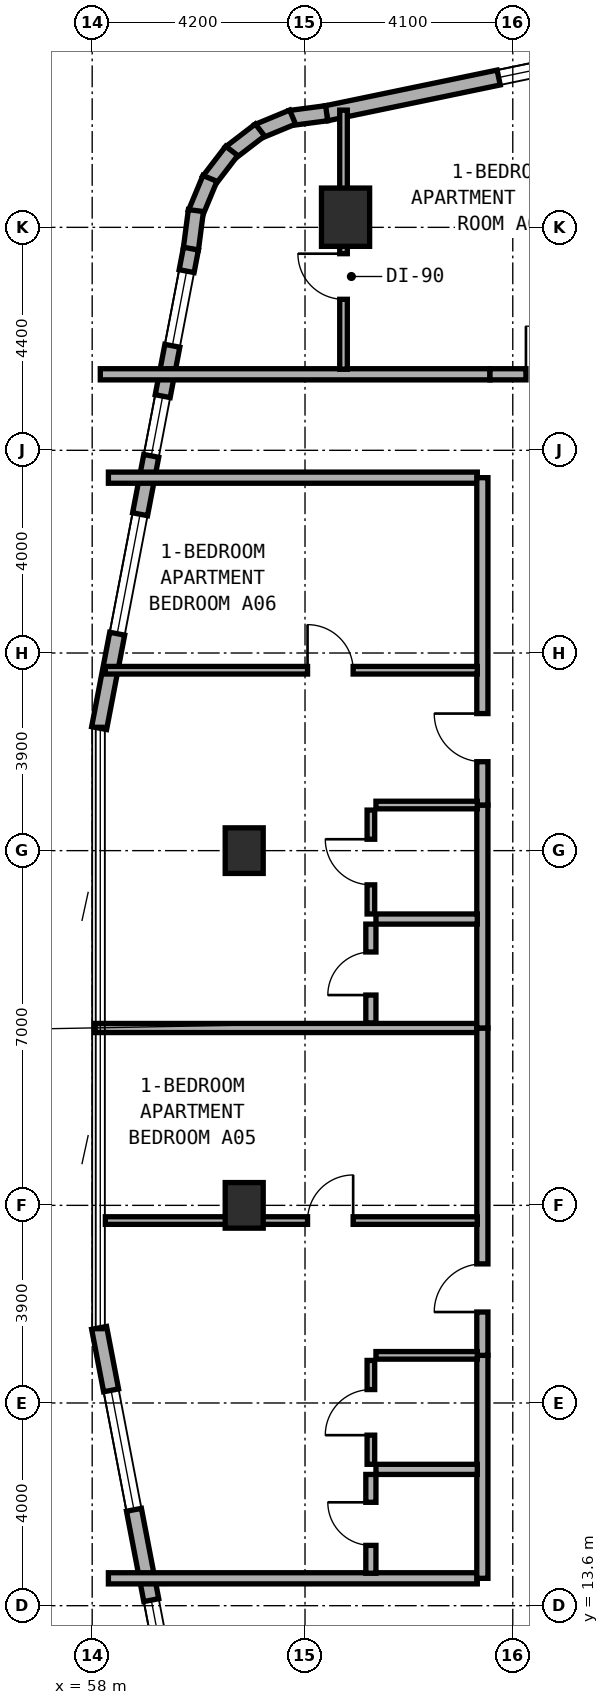
"""IFC4 building model, lengths in metres.
Left out: names, types, materials, properties, quantities, classifications, styles, units other than length and angle.
Written with IfcOpenShell. Run it as: python <this file> out.ifc"""

import sys

from ifc_helpers import new_model, si_unit, direction, frame, frame_2d, origin, origin_2d, place, context, subcontext, project, spatial, rectangle, extrude, element, fill, save


model = new_model("IFC4")
c1 = context("Model", 3, precision=1e-05, world=origin(), true_north=direction((0.0, 1.0)))
c2 = subcontext(c1, "Body", "Model", "MODEL_VIEW")
j1 = project(units=[si_unit("LENGTHUNIT", "METRE"), si_unit("PLANEANGLEUNIT", "RADIAN")], contexts=[c1])
p1 = place(None, origin())
s1 = spatial("IfcSite", under=j1, at=p1, CompositionType="ELEMENT")
p2 = place(p1, origin())
s2 = spatial("IfcBuilding", under=s1, at=p2, CompositionType="ELEMENT")
p3 = place(p2, frame((0.0, 0.0, 62.5)))
s3 = spatial("IfcBuildingStorey", under=s2, at=p3, CompositionType="ELEMENT", Elevation=62.5)
for number, where, z_axis, x_axis in (
    (1, (61.0, 21.5, 0.0), (0.0, 0.0, 1.0), (1.0, 0.0, 0.0)),
    (2, (61.0, 28.5, 0.0), (0.0, 0.0, 1.0), (1.0, 0.0, 0.0)),
):
    element("IfcColumn", number, at=place(p3, frame(where, z_axis=z_axis, x_axis=x_axis)), inside=s3, PredefinedType="COLUMN", context=c2, shape_type="SweptSolid", body=[
        extrude(rectangle(XDim=0.75, YDim=0.9, at=origin_2d()), origin(), (0.0, 0.0, 1.0), 3.5),
    ])
p4 = place(p3, frame((63.0, 41.0, 0.0), z_axis=(0.0, 0.0, 1.0), x_axis=(1.0, 0.0, 0.0)))
e3 = element("IfcColumn", 3, at=p4, inside=s3, PredefinedType="COLUMN", context=c2, shape_type="SweptSolid", body=[
    extrude(rectangle(XDim=0.95, YDim=1.15, at=origin_2d()), origin(), (0.0, 0.0, 1.0), 3.5),
])
p5 = place(p3, frame((71.356, 44.864, 0.0), z_axis=(0.0, 0.0, 1.0), x_axis=(-0.979127260729, -0.203248142175, 0.0)))
e4 = element("IfcWall", 4, at=p5, inside=s3, PredefinedType="STANDARD", context=c2, shape_type="SweptSolid", body=[
    extrude(rectangle(XDim=8.92, YDim=0.3, at=frame_2d((4.46, 0.0))), origin(), (0.0, 0.0, 1.0), 3.25),
])
p6 = place(p5, frame((3.048, 0.0, 0.8)))
e5 = element("IfcOpeningElement", 5, at=p6, cuts=e4, PredefinedType="OPENING", context=c2, shape_type="SweptSolid", body=[
    extrude(rectangle(XDim=2.4, YDim=1.6, at=frame_2d((1.2, 0.8))), frame((0.0, 0.16, 0.0), z_axis=(0.0, -1.0, 0.0), x_axis=(1.0, 0.0, 0.0)), (0.0, 0.0, 1.0), 0.32),
])
p7 = place(p3, frame((62.627, 43.052, 0.0), z_axis=(0.0, 0.0, 1.0), x_axis=(-0.991480488834, -0.130255288807, 0.0)))
e6 = element("IfcWall", 6, at=p7, inside=s3, PredefinedType="STANDARD", context=c2, shape_type="SweptSolid", body=[
    extrude(rectangle(XDim=0.729, YDim=0.3, at=frame_2d((0.365, 0.0))), origin(), (0.0, 0.0, 1.0), 3.25),
])
for number, where, z_axis, x_axis in (
    (7, (61.955, 42.976, 0.0), (0.0, 0.0, 1.0), (-0.924, -0.384, 0.0)),
    (8, (61.311, 42.721, 0.0), (0.0, 0.0, 1.0), (-0.794, -0.608, 0.0)),
    (9, (60.754, 42.309, 0.0), (0.0, 0.0, 1.0), (-0.608, -0.794, 0.0)),
    (10, (60.324, 41.766, 0.0), (0.0, 0.0, 1.0), (-0.383, -0.924, 0.0)),
):
    element("IfcWall", number, at=place(p3, frame(where, z_axis=z_axis, x_axis=x_axis)), inside=s3, PredefinedType="STANDARD", context=c2, shape_type="SweptSolid", body=[
        extrude(rectangle(XDim=0.746, YDim=0.3, at=frame_2d((0.373, 0.0))), origin(), (0.0, 0.0, 1.0), 3.25),
    ])
p8 = place(p3, frame((60.047, 41.131, 0.0), z_axis=(0.0, 0.0, 1.0), x_axis=(-0.129653178221, -0.991559404866, 0.0)))
e11 = element("IfcWall", 11, at=p8, inside=s3, PredefinedType="STANDARD", context=c2, shape_type="SweptSolid", body=[
    extrude(rectangle(XDim=0.764, YDim=0.3, at=frame_2d((0.382, 0.0))), origin(), (0.0, 0.0, 1.0), 3.25),
])
p9 = place(p3, frame((59.949, 40.38, 0.0), z_axis=(0.0, 0.0, 1.0), x_axis=(-0.188087874316, -0.982152203854, 0.0)))
e12 = element("IfcWall", 12, at=p9, inside=s3, PredefinedType="STANDARD", context=c2, shape_type="SweptSolid", body=[
    extrude(rectangle(XDim=9.634, YDim=0.3, at=frame_2d((4.817, 0.0))), origin(), (0.0, 0.0, 1.0), 3.25),
])
p10 = place(p9, frame((0.452, 0.0, 0.85)))
e13 = element("IfcOpeningElement", 13, at=p10, cuts=e12, PredefinedType="OPENING", context=c2, shape_type="SweptSolid", body=[
    extrude(rectangle(XDim=1.5, YDim=1.5, at=frame_2d((0.75, 0.75))), frame((0.0, 0.16, 0.0), z_axis=(0.0, -1.0, 0.0), x_axis=(1.0, 0.0, 0.0)), (0.0, 0.0, 1.0), 0.32),
])
p11 = place(p9, frame((2.964, 0.0, 0.85)))
e14 = element("IfcOpeningElement", 14, at=p11, cuts=e12, PredefinedType="OPENING", context=c2, shape_type="SweptSolid", body=[
    extrude(rectangle(XDim=1.2, YDim=1.5, at=frame_2d((0.6, 0.75))), frame((0.0, 0.16, 0.0), z_axis=(0.0, -1.0, 0.0), x_axis=(1.0, 0.0, 0.0)), (0.0, 0.0, 1.0), 0.32),
])
p12 = place(p9, frame((5.337, 0.0, 0.8)))
e15 = element("IfcOpeningElement", 15, at=p12, cuts=e12, PredefinedType="OPENING", context=c2, shape_type="SweptSolid", body=[
    extrude(rectangle(XDim=2.4, YDim=1.6, at=frame_2d((1.2, 0.8))), frame((0.0, 0.16, 0.0), z_axis=(0.0, -1.0, 0.0), x_axis=(1.0, 0.0, 0.0)), (0.0, 0.0, 1.0), 0.32),
])
p13 = place(p3, frame((58.137, 19.082, 0.0), z_axis=(0.0, 0.0, 1.0), x_axis=(0.188087874316, -0.982152203854, 0.0)))
e16 = element("IfcWall", 16, at=p13, inside=s3, PredefinedType="STANDARD", context=c2, shape_type="SweptSolid", body=[
    extrude(rectangle(XDim=9.634, YDim=0.3, at=frame_2d((4.817, 0.0))), origin(), (0.0, 0.0, 1.0), 3.25),
])
p14 = place(p13, frame((1.255, 0.0, 0.8)))
e17 = element("IfcOpeningElement", 17, at=p14, cuts=e16, PredefinedType="OPENING", context=c2, shape_type="SweptSolid", body=[
    extrude(rectangle(XDim=2.4, YDim=1.6, at=frame_2d((1.2, 0.8))), frame((0.0, 0.16, 0.0), z_axis=(0.0, -1.0, 0.0), x_axis=(1.0, 0.0, 0.0)), (0.0, 0.0, 1.0), 0.32),
])
p15 = place(p13, frame((5.47, 0.0, 0.85)))
e18 = element("IfcOpeningElement", 18, at=p15, cuts=e16, PredefinedType="OPENING", context=c2, shape_type="SweptSolid", body=[
    extrude(rectangle(XDim=1.2, YDim=1.5, at=frame_2d((0.6, 0.75))), frame((0.0, 0.16, 0.0), z_axis=(0.0, -1.0, 0.0), x_axis=(1.0, 0.0, 0.0)), (0.0, 0.0, 1.0), 0.32),
])
p16 = place(p13, frame((7.682, 0.0, 0.85)))
e19 = element("IfcOpeningElement", 19, at=p16, cuts=e16, PredefinedType="OPENING", context=c2, shape_type="SweptSolid", body=[
    extrude(rectangle(XDim=1.5, YDim=1.5, at=frame_2d((0.75, 0.75))), frame((0.0, 0.16, 0.0), z_axis=(0.0, -1.0, 0.0), x_axis=(1.0, 0.0, 0.0)), (0.0, 0.0, 1.0), 0.32),
])
p17 = place(p3, frame((58.16, 37.9, 0.0), z_axis=(0.0, 0.0, 1.0), x_axis=(1.0, 0.0, 0.0)))
e20 = element("IfcWall", 20, at=p17, inside=s3, PredefinedType="SOLIDWALL", context=c2, shape_type="SweptSolid", body=[
    extrude(rectangle(XDim=7.69, YDim=0.22, at=frame_2d((3.845, 0.0))), origin(), (0.0, 0.0, 1.0), 2.865),
])
p18 = place(p3, frame((65.85, 37.9, 0.0), z_axis=(0.0, 0.0, 1.0), x_axis=(1.0, 0.0, 0.0)))
e21 = element("IfcWall", 21, at=p18, inside=s3, PredefinedType="SOLIDWALL", context=c2, shape_type="SweptSolid", body=[
    extrude(rectangle(XDim=2.37, YDim=0.22, at=frame_2d((1.185, 0.0))), origin(), (0.0, 0.0, 1.0), 3.22),
])
p19 = place(p18, frame((0.71, 0.0, 0.0)))
e22 = element("IfcOpeningElement", 22, at=p19, cuts=e21, PredefinedType="OPENING", context=c2, shape_type="SweptSolid", body=[
    extrude(rectangle(XDim=0.95, YDim=2.1, at=frame_2d((0.475, 1.05))), frame((0.0, 0.12, 0.0), z_axis=(0.0, -1.0, 0.0), x_axis=(1.0, 0.0, 0.0)), (0.0, 0.0, 1.0), 0.24),
])
p20 = place(p3, frame((62.96, 38.0, 0.0), z_axis=(0.0, 0.0, 1.0), x_axis=(0.0, 1.0, 0.0)))
e23 = element("IfcWall", 23, at=p20, inside=s3, PredefinedType="PARTITIONING", context=c2, shape_type="SweptSolid", body=[
    extrude(rectangle(XDim=5.113, YDim=0.15, at=frame_2d((2.557, 0.0))), origin(), (0.0, 0.0, 1.0), 2.865),
])
p21 = place(p20, frame((1.38, 0.0, 0.0)))
e24 = element("IfcOpeningElement", 24, at=p21, cuts=e23, PredefinedType="OPENING", context=c2, shape_type="SweptSolid", body=[
    extrude(rectangle(XDim=0.9, YDim=2.1, at=frame_2d((0.45, 1.05))), frame((0.0, 0.085, 0.0), z_axis=(0.0, -1.0, 0.0), x_axis=(1.0, 0.0, 0.0)), (0.0, 0.0, 1.0), 0.17),
])
for number, where, z_axis, x_axis in (
    (25, (58.32, 14.14, 0.0), (0.0, 0.0, 1.0), (1.0, 0.0, 0.0)),
    (26, (58.32, 35.86, 0.0), (0.0, 0.0, 1.0), (1.0, 0.0, 0.0)),
):
    element("IfcWall", number, at=place(p3, frame(where, z_axis=z_axis, x_axis=x_axis)), inside=s3, PredefinedType="SOLIDWALL", context=c2, shape_type="SweptSolid", body=[
        extrude(rectangle(XDim=7.28, YDim=0.22, at=frame_2d((3.64, 0.0))), origin(), (0.0, 0.0, 1.0), 2.865),
    ])
p22 = place(p3, frame((58.06, 25.0, 0.0), z_axis=(0.0, 0.0, 1.0), x_axis=(1.0, 0.0, 0.0)))
e27 = element("IfcWall", 27, at=p22, inside=s3, PredefinedType="SOLIDWALL", context=c2, shape_type="SweptSolid", body=[
    extrude(rectangle(XDim=7.64, YDim=0.18, at=frame_2d((3.82, 0.0))), origin(), (0.0, 0.0, 1.0), 2.865),
])
p23 = place(p3, frame((65.7, 14.14, 0.0), z_axis=(0.0, 0.0, 1.0), x_axis=(0.0, 1.0, 0.0)))
e28 = element("IfcWall", 28, at=p23, inside=s3, PredefinedType="SOLIDWALL", context=c2, shape_type="SweptSolid", body=[
    extrude(rectangle(XDim=4.4, YDim=0.22, at=frame_2d((2.2, 0.0))), origin(), (0.0, 0.0, 1.0), 3.22),
])
p24 = place(p3, frame((65.7, 18.54, 0.0), z_axis=(0.0, 0.0, 1.0), x_axis=(0.0, 1.0, 0.0)))
e29 = element("IfcWall", 29, at=p24, inside=s3, PredefinedType="SOLIDWALL", context=c2, shape_type="SweptSolid", body=[
    extrude(rectangle(XDim=6.46, YDim=0.22, at=frame_2d((3.23, 0.0))), origin(), (0.0, 0.0, 1.0), 2.725),
])
p25 = place(p24, frame((0.855, 0.0, 0.0)))
e30 = element("IfcOpeningElement", 30, at=p25, cuts=e29, PredefinedType="OPENING", context=c2, shape_type="SweptSolid", body=[
    extrude(rectangle(XDim=0.95, YDim=2.1, at=frame_2d((0.475, 1.05))), frame((0.0, 0.12, 0.0), z_axis=(0.0, -1.0, 0.0), x_axis=(1.0, 0.0, 0.0)), (0.0, 0.0, 1.0), 0.24),
])
p26 = place(p3, frame((58.26, 21.2, 0.0), z_axis=(0.0, 0.0, 1.0), x_axis=(1.0, 0.0, 0.0)))
e31 = element("IfcWall", 31, at=p26, inside=s3, PredefinedType="PARTITIONING", context=c2, shape_type="SweptSolid", body=[
    extrude(rectangle(XDim=7.34, YDim=0.15, at=frame_2d((3.67, 0.0))), origin(), (0.0, 0.0, 1.0), 2.865),
])
p27 = place(p26, frame((3.99, 0.0, 0.0)))
e32 = element("IfcOpeningElement", 32, at=p27, cuts=e31, PredefinedType="OPENING", context=c2, shape_type="SweptSolid", body=[
    extrude(rectangle(XDim=0.9, YDim=2.1, at=frame_2d((0.45, 1.05))), frame((0.0, 0.085, 0.0), z_axis=(0.0, -1.0, 0.0), x_axis=(1.0, 0.0, 0.0)), (0.0, 0.0, 1.0), 0.17),
])
p28 = place(p3, frame((63.6, 16.29, 0.0), z_axis=(0.0, 0.0, 1.0), x_axis=(1.0, 0.0, 0.0)))
e33 = element("IfcWall", 33, at=p28, inside=s3, PredefinedType="PLUMBINGWALL", context=c2, shape_type="SweptSolid", body=[
    extrude(rectangle(XDim=2.0, YDim=0.2, at=frame_2d((1.0, 0.0))), origin(), (0.0, 0.0, 1.0), 3.22),
])
p29 = place(p3, frame((63.6, 18.54, 0.0), z_axis=(0.0, 0.0, 1.0), x_axis=(1.0, 0.0, 0.0)))
e34 = element("IfcWall", 34, at=p29, inside=s3, PredefinedType="PARTITIONING", context=c2, shape_type="SweptSolid", body=[
    extrude(rectangle(XDim=2.0, YDim=0.15, at=frame_2d((1.0, 0.0))), origin(), (0.0, 0.0, 1.0), 3.22),
])
p30 = place(p3, frame((63.5, 14.24, 0.0), z_axis=(0.0, 0.0, 1.0), x_axis=(0.0, 1.0, 0.0)))
e35 = element("IfcWall", 35, at=p30, inside=s3, PredefinedType="PLUMBINGWALL", context=c2, shape_type="SweptSolid", body=[
    extrude(rectangle(XDim=1.95, YDim=0.2, at=frame_2d((0.975, 0.0))), origin(), (0.0, 0.0, 1.0), 3.22),
])
p31 = place(p30, frame((0.55, 0.0, 0.0)))
e36 = element("IfcOpeningElement", 36, at=p31, cuts=e35, PredefinedType="OPENING", context=c2, shape_type="SweptSolid", body=[
    extrude(rectangle(XDim=0.85, YDim=2.1, at=frame_2d((0.425, 1.05))), frame((0.0, 0.11, 0.0), z_axis=(0.0, -1.0, 0.0), x_axis=(1.0, 0.0, 0.0)), (0.0, 0.0, 1.0), 0.22),
])
p32 = place(p3, frame((63.5, 16.39, 0.0), z_axis=(0.0, 0.0, 1.0), x_axis=(0.0, 1.0, 0.0)))
e37 = element("IfcWall", 37, at=p32, inside=s3, PredefinedType="PARTITIONING", context=c2, shape_type="SweptSolid", body=[
    extrude(rectangle(XDim=2.05, YDim=0.15, at=frame_2d((1.025, 0.0))), origin(), (0.0, 0.0, 1.0), 3.22),
])
p33 = place(p32, frame((0.575, 0.0, 0.0)))
e38 = element("IfcOpeningElement", 38, at=p33, cuts=e37, PredefinedType="OPENING", context=c2, shape_type="SweptSolid", body=[
    extrude(rectangle(XDim=0.9, YDim=2.1, at=frame_2d((0.45, 1.05))), frame((0.0, 0.085, 0.0), z_axis=(0.0, -1.0, 0.0), x_axis=(1.0, 0.0, 0.0)), (0.0, 0.0, 1.0), 0.17),
])
p34 = place(p3, frame((65.7, 25.0, 0.0), z_axis=(0.0, 0.0, 1.0), x_axis=(0.0, 1.0, 0.0)))
e39 = element("IfcWall", 39, at=p34, inside=s3, PredefinedType="SOLIDWALL", context=c2, shape_type="SweptSolid", body=[
    extrude(rectangle(XDim=4.4, YDim=0.22, at=frame_2d((2.2, 0.0))), origin(), (0.0, 0.0, 1.0), 2.725),
])
p35 = place(p3, frame((65.7, 29.4, 0.0), z_axis=(0.0, 0.0, 1.0), x_axis=(0.0, 1.0, 0.0)))
e40 = element("IfcWall", 40, at=p35, inside=s3, PredefinedType="SOLIDWALL", context=c2, shape_type="SweptSolid", body=[
    extrude(rectangle(XDim=6.46, YDim=0.22, at=frame_2d((3.23, 0.0))), origin(), (0.0, 0.0, 1.0), 3.22),
])
p36 = place(p35, frame((0.855, 0.0, 0.0)))
e41 = element("IfcOpeningElement", 41, at=p36, cuts=e40, PredefinedType="OPENING", context=c2, shape_type="SweptSolid", body=[
    extrude(rectangle(XDim=0.95, YDim=2.1, at=frame_2d((0.475, 1.05))), frame((0.0, 0.12, 0.0), z_axis=(0.0, -1.0, 0.0), x_axis=(1.0, 0.0, 0.0)), (0.0, 0.0, 1.0), 0.24),
])
p37 = place(p3, frame((58.26, 32.06, 0.0), z_axis=(0.0, 0.0, 1.0), x_axis=(1.0, 0.0, 0.0)))
e42 = element("IfcWall", 42, at=p37, inside=s3, PredefinedType="PARTITIONING", context=c2, shape_type="SweptSolid", body=[
    extrude(rectangle(XDim=7.34, YDim=0.15, at=frame_2d((3.67, 0.0))), origin(), (0.0, 0.0, 1.0), 2.865),
])
p38 = place(p37, frame((3.99, 0.0, 0.0)))
e43 = element("IfcOpeningElement", 43, at=p38, cuts=e42, PredefinedType="OPENING", context=c2, shape_type="SweptSolid", body=[
    extrude(rectangle(XDim=0.9, YDim=2.1, at=frame_2d((0.45, 1.05))), frame((0.0, 0.085, 0.0), z_axis=(0.0, -1.0, 0.0), x_axis=(1.0, 0.0, 0.0)), (0.0, 0.0, 1.0), 0.17),
])
p39 = place(p3, frame((63.6, 27.15, 0.0), z_axis=(0.0, 0.0, 1.0), x_axis=(1.0, 0.0, 0.0)))
e44 = element("IfcWall", 44, at=p39, inside=s3, PredefinedType="PLUMBINGWALL", context=c2, shape_type="SweptSolid", body=[
    extrude(rectangle(XDim=2.0, YDim=0.2, at=frame_2d((1.0, 0.0))), origin(), (0.0, 0.0, 1.0), 3.22),
])
p40 = place(p3, frame((63.6, 29.4, 0.0), z_axis=(0.0, 0.0, 1.0), x_axis=(1.0, 0.0, 0.0)))
e45 = element("IfcWall", 45, at=p40, inside=s3, PredefinedType="PARTITIONING", context=c2, shape_type="SweptSolid", body=[
    extrude(rectangle(XDim=2.0, YDim=0.15, at=frame_2d((1.0, 0.0))), origin(), (0.0, 0.0, 1.0), 3.22),
])
p41 = place(p3, frame((63.5, 25.1, 0.0), z_axis=(0.0, 0.0, 1.0), x_axis=(0.0, 1.0, 0.0)))
e46 = element("IfcWall", 46, at=p41, inside=s3, PredefinedType="PLUMBINGWALL", context=c2, shape_type="SweptSolid", body=[
    extrude(rectangle(XDim=1.95, YDim=0.2, at=frame_2d((0.975, 0.0))), origin(), (0.0, 0.0, 1.0), 3.22),
])
p42 = place(p41, frame((0.55, 0.0, 0.0)))
e47 = element("IfcOpeningElement", 47, at=p42, cuts=e46, PredefinedType="OPENING", context=c2, shape_type="SweptSolid", body=[
    extrude(rectangle(XDim=0.85, YDim=2.1, at=frame_2d((0.425, 1.05))), frame((0.0, 0.11, 0.0), z_axis=(0.0, -1.0, 0.0), x_axis=(1.0, 0.0, 0.0)), (0.0, 0.0, 1.0), 0.22),
])
p43 = place(p3, frame((63.5, 27.25, 0.0), z_axis=(0.0, 0.0, 1.0), x_axis=(0.0, 1.0, 0.0)))
e48 = element("IfcWall", 48, at=p43, inside=s3, PredefinedType="PARTITIONING", context=c2, shape_type="SweptSolid", body=[
    extrude(rectangle(XDim=2.05, YDim=0.15, at=frame_2d((1.025, 0.0))), origin(), (0.0, 0.0, 1.0), 2.725),
])
p44 = place(p43, frame((0.575, 0.0, 0.0)))
e49 = element("IfcOpeningElement", 49, at=p44, cuts=e48, PredefinedType="OPENING", context=c2, shape_type="SweptSolid", body=[
    extrude(rectangle(XDim=0.9, YDim=2.1, at=frame_2d((0.45, 1.05))), frame((0.0, 0.085, 0.0), z_axis=(0.0, -1.0, 0.0), x_axis=(1.0, 0.0, 0.0)), (0.0, 0.0, 1.0), 0.17),
])
p45 = place(p6, origin())
e50 = element("IfcWindow", 50, at=p45, inside=s3, PartitioningType="SINGLE_PANEL", PredefinedType="WINDOW", context=c2, shape_type="SweptSolid", body=[
    extrude(rectangle(XDim=2.4, YDim=1.6, at=frame_2d((1.2, 0.8))), frame((0.0, 0.03, 0.0), z_axis=(0.0, -1.0, 0.0), x_axis=(1.0, 0.0, 0.0)), (0.0, 0.0, 1.0), 0.06),
])
fill(e5, e50)
p46 = place(p10, origin())
e51 = element("IfcWindow", 51, at=p46, inside=s3, PartitioningType="SINGLE_PANEL", PredefinedType="WINDOW", context=c2, shape_type="SweptSolid", body=[
    extrude(rectangle(XDim=1.5, YDim=1.5, at=frame_2d((0.75, 0.75))), frame((0.0, 0.03, 0.0), z_axis=(0.0, -1.0, 0.0), x_axis=(1.0, 0.0, 0.0)), (0.0, 0.0, 1.0), 0.06),
])
fill(e13, e51)
p47 = place(p11, origin())
e52 = element("IfcWindow", 52, at=p47, inside=s3, PartitioningType="SINGLE_PANEL", PredefinedType="WINDOW", context=c2, shape_type="SweptSolid", body=[
    extrude(rectangle(XDim=1.2, YDim=1.5, at=frame_2d((0.6, 0.75))), frame((0.0, 0.03, 0.0), z_axis=(0.0, -1.0, 0.0), x_axis=(1.0, 0.0, 0.0)), (0.0, 0.0, 1.0), 0.06),
])
fill(e14, e52)
p48 = place(p12, origin())
e53 = element("IfcWindow", 53, at=p48, inside=s3, PartitioningType="SINGLE_PANEL", PredefinedType="WINDOW", context=c2, shape_type="SweptSolid", body=[
    extrude(rectangle(XDim=2.4, YDim=1.6, at=frame_2d((1.2, 0.8))), frame((0.0, 0.03, 0.0), z_axis=(0.0, -1.0, 0.0), x_axis=(1.0, 0.0, 0.0)), (0.0, 0.0, 1.0), 0.06),
])
fill(e15, e53)
p49 = place(p14, origin())
e54 = element("IfcWindow", 54, at=p49, inside=s3, PartitioningType="SINGLE_PANEL", PredefinedType="WINDOW", context=c2, shape_type="SweptSolid", body=[
    extrude(rectangle(XDim=2.4, YDim=1.6, at=frame_2d((1.2, 0.8))), frame((0.0, 0.03, 0.0), z_axis=(0.0, -1.0, 0.0), x_axis=(1.0, 0.0, 0.0)), (0.0, 0.0, 1.0), 0.06),
])
fill(e17, e54)
p50 = place(p15, origin())
e55 = element("IfcWindow", 55, at=p50, inside=s3, PartitioningType="SINGLE_PANEL", PredefinedType="WINDOW", context=c2, shape_type="SweptSolid", body=[
    extrude(rectangle(XDim=1.2, YDim=1.5, at=frame_2d((0.6, 0.75))), frame((0.0, 0.03, 0.0), z_axis=(0.0, -1.0, 0.0), x_axis=(1.0, 0.0, 0.0)), (0.0, 0.0, 1.0), 0.06),
])
fill(e18, e55)
p51 = place(p19, origin())
e56 = element("IfcDoor", 56, at=p51, inside=s3, OperationType="SINGLE_SWING_LEFT", PredefinedType="DOOR", context=c2, shape_type="SweptSolid", body=[
    extrude(rectangle(XDim=0.95, YDim=2.1, at=frame_2d((0.475, 1.05))), frame((0.0, 0.025, 0.0), z_axis=(0.0, -1.0, 0.0), x_axis=(1.0, 0.0, 0.0)), (0.0, 0.0, 1.0), 0.05),
])
fill(e22, e56)
p52 = place(p21, origin())
e57 = element("IfcDoor", 57, at=p52, inside=s3, OperationType="SINGLE_SWING_RIGHT", PredefinedType="DOOR", context=c2, shape_type="SweptSolid", body=[
    extrude(rectangle(XDim=0.9, YDim=2.1, at=frame_2d((0.45, 1.05))), frame((0.0, 0.025, 0.0), z_axis=(0.0, -1.0, 0.0), x_axis=(1.0, 0.0, 0.0)), (0.0, 0.0, 1.0), 0.05),
])
fill(e24, e57)
p53 = place(p25, origin())
e58 = element("IfcDoor", 58, at=p53, inside=s3, OperationType="SINGLE_SWING_LEFT", PredefinedType="DOOR", context=c2, shape_type="SweptSolid", body=[
    extrude(rectangle(XDim=0.95, YDim=2.1, at=frame_2d((0.475, 1.05))), frame((0.0, 0.025, 0.0), z_axis=(0.0, -1.0, 0.0), x_axis=(1.0, 0.0, 0.0)), (0.0, 0.0, 1.0), 0.05),
])
fill(e30, e58)
p54 = place(p27, origin())
e59 = element("IfcDoor", 59, at=p54, inside=s3, OperationType="SINGLE_SWING_RIGHT", PredefinedType="DOOR", context=c2, shape_type="SweptSolid", body=[
    extrude(rectangle(XDim=0.9, YDim=2.1, at=frame_2d((0.45, 1.05))), frame((0.0, 0.025, 0.0), z_axis=(0.0, -1.0, 0.0), x_axis=(1.0, 0.0, 0.0)), (0.0, 0.0, 1.0), 0.05),
])
fill(e32, e59)
p55 = place(p31, origin())
e60 = element("IfcDoor", 60, at=p55, inside=s3, OperationType="SINGLE_SWING_RIGHT", PredefinedType="DOOR", context=c2, shape_type="SweptSolid", body=[
    extrude(rectangle(XDim=0.85, YDim=2.1, at=frame_2d((0.425, 1.05))), frame((0.0, 0.025, 0.0), z_axis=(0.0, -1.0, 0.0), x_axis=(1.0, 0.0, 0.0)), (0.0, 0.0, 1.0), 0.05),
])
fill(e36, e60)
p56 = place(p33, origin())
e61 = element("IfcDoor", 61, at=p56, inside=s3, OperationType="SINGLE_SWING_LEFT", PredefinedType="DOOR", context=c2, shape_type="SweptSolid", body=[
    extrude(rectangle(XDim=0.9, YDim=2.1, at=frame_2d((0.45, 1.05))), frame((0.0, 0.025, 0.0), z_axis=(0.0, -1.0, 0.0), x_axis=(1.0, 0.0, 0.0)), (0.0, 0.0, 1.0), 0.05),
])
fill(e38, e61)
p57 = place(p36, origin())
e62 = element("IfcDoor", 62, at=p57, inside=s3, OperationType="SINGLE_SWING_RIGHT", PredefinedType="DOOR", context=c2, shape_type="SweptSolid", body=[
    extrude(rectangle(XDim=0.95, YDim=2.1, at=frame_2d((0.475, 1.05))), frame((0.0, 0.025, 0.0), z_axis=(0.0, -1.0, 0.0), x_axis=(1.0, 0.0, 0.0)), (0.0, 0.0, 1.0), 0.05),
])
fill(e41, e62)
p58 = place(p38, origin())
e63 = element("IfcDoor", 63, at=p58, inside=s3, OperationType="SINGLE_SWING_LEFT", PredefinedType="DOOR", context=c2, shape_type="SweptSolid", body=[
    extrude(rectangle(XDim=0.9, YDim=2.1, at=frame_2d((0.45, 1.05))), frame((0.0, 0.025, 0.0), z_axis=(0.0, -1.0, 0.0), x_axis=(1.0, 0.0, 0.0)), (0.0, 0.0, 1.0), 0.05),
])
fill(e43, e63)
p59 = place(p42, origin())
e64 = element("IfcDoor", 64, at=p59, inside=s3, OperationType="SINGLE_SWING_LEFT", PredefinedType="DOOR", context=c2, shape_type="SweptSolid", body=[
    extrude(rectangle(XDim=0.85, YDim=2.1, at=frame_2d((0.425, 1.05))), frame((0.0, 0.025, 0.0), z_axis=(0.0, -1.0, 0.0), x_axis=(1.0, 0.0, 0.0)), (0.0, 0.0, 1.0), 0.05),
])
fill(e47, e64)
p60 = place(p44, origin())
e65 = element("IfcDoor", 65, at=p60, inside=s3, OperationType="SINGLE_SWING_RIGHT", PredefinedType="DOOR", context=c2, shape_type="SweptSolid", body=[
    extrude(rectangle(XDim=0.9, YDim=2.1, at=frame_2d((0.45, 1.05))), frame((0.0, 0.025, 0.0), z_axis=(0.0, -1.0, 0.0), x_axis=(1.0, 0.0, 0.0)), (0.0, 0.0, 1.0), 0.05),
])
fill(e49, e65)
save(model, sys.argv[1])
